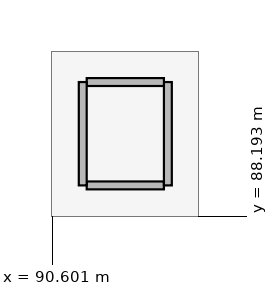
"""IFC4 building model, lengths in metres.
Left out: names, types, materials, properties, quantities, classifications, styles, units other than length and angle.
Written with IfcOpenShell. Run it as: python <this file> out.ifc"""

import sys

from ifc_helpers import new_model, si_unit, direction, frame, frame_2d, origin, place, context, subcontext, project, spatial, rectangle, extrude, element, fill, save


model = new_model("IFC4")
c1 = context("Model", 3, precision=1e-05, world=origin(), true_north=direction((0.0, 1.0)))
c2 = subcontext(c1, "Body", "Model", "MODEL_VIEW")
j1 = project(units=[si_unit("LENGTHUNIT", "METRE"), si_unit("PLANEANGLEUNIT", "RADIAN")], contexts=[c1])
p1 = place(None, origin())
s1 = spatial("IfcSite", under=j1, at=p1, CompositionType="ELEMENT")
p2 = place(p1, origin())
s2 = spatial("IfcBuilding", under=s1, at=p2, CompositionType="ELEMENT")
p3 = place(p2, origin())
s3 = spatial("IfcBuildingStorey", under=s2, at=p3, CompositionType="ELEMENT", Elevation=0.0)
p4 = place(p3, frame((91.73, 89.2, 0.0), z_axis=(0.0, 0.0, 1.0), x_axis=(1.0, 0.0, 0.0)))
e1 = element("IfcWall", 1, at=p4, inside=s3, PredefinedType="SHEAR", context=c2, shape_type="SweptSolid", body=[
    extrude(rectangle(XDim=2.54, YDim=0.26, at=frame_2d((1.27, 0.0))), origin(), (0.0, 0.0, 1.0), 6.28),
])
p5 = place(p3, frame((94.4, 89.2, 0.0), z_axis=(0.0, 0.0, 1.0), x_axis=(0.0, 1.0, 0.0)))
e2 = element("IfcWall", 2, at=p5, inside=s3, PredefinedType="SHEAR", context=c2, shape_type="SweptSolid", body=[
    extrude(rectangle(XDim=3.4, YDim=0.26, at=frame_2d((1.7, 0.0))), origin(), (0.0, 0.0, 1.0), 6.28),
])
p6 = place(p3, frame((94.27, 92.6, 0.0), z_axis=(0.0, 0.0, 1.0), x_axis=(-1.0, 0.0, 0.0)))
e3 = element("IfcWall", 3, at=p6, inside=s3, PredefinedType="SHEAR", context=c2, shape_type="SweptSolid", body=[
    extrude(rectangle(XDim=2.54, YDim=0.26, at=frame_2d((1.27, 0.0))), origin(), (0.0, 0.0, 1.0), 6.28),
])
p7 = place(p6, frame((0.57, 0.0, 0.0)))
e4 = element("IfcOpeningElement", 4, at=p7, cuts=e3, PredefinedType="OPENING", context=c2, shape_type="SweptSolid", body=[
    extrude(rectangle(XDim=1.4, YDim=2.25, at=frame_2d((0.7, 1.125))), frame((0.0, 0.14, 0.0), z_axis=(0.0, -1.0, 0.0), x_axis=(1.0, 0.0, 0.0)), (0.0, 0.0, 1.0), 0.28),
])
p8 = place(p3, frame((91.6, 92.6, 0.0), z_axis=(0.0, 0.0, 1.0), x_axis=(0.0, -1.0, 0.0)))
e5 = element("IfcWall", 5, at=p8, inside=s3, PredefinedType="SHEAR", context=c2, shape_type="SweptSolid", body=[
    extrude(rectangle(XDim=3.4, YDim=0.26, at=frame_2d((1.7, 0.0))), origin(), (0.0, 0.0, 1.0), 6.28),
])
p9 = place(p7, origin())
e6 = element("IfcDoor", 6, at=p9, inside=s3, OperationType="DOUBLE_DOOR_SLIDING", PredefinedType="DOOR", context=c2, shape_type="SweptSolid", body=[
    extrude(rectangle(XDim=1.4, YDim=2.25, at=frame_2d((0.7, 1.125))), frame((0.0, 0.025, 0.0), z_axis=(0.0, -1.0, 0.0), x_axis=(1.0, 0.0, 0.0)), (0.0, 0.0, 1.0), 0.05),
])
fill(e4, e6)
save(model, sys.argv[1])
